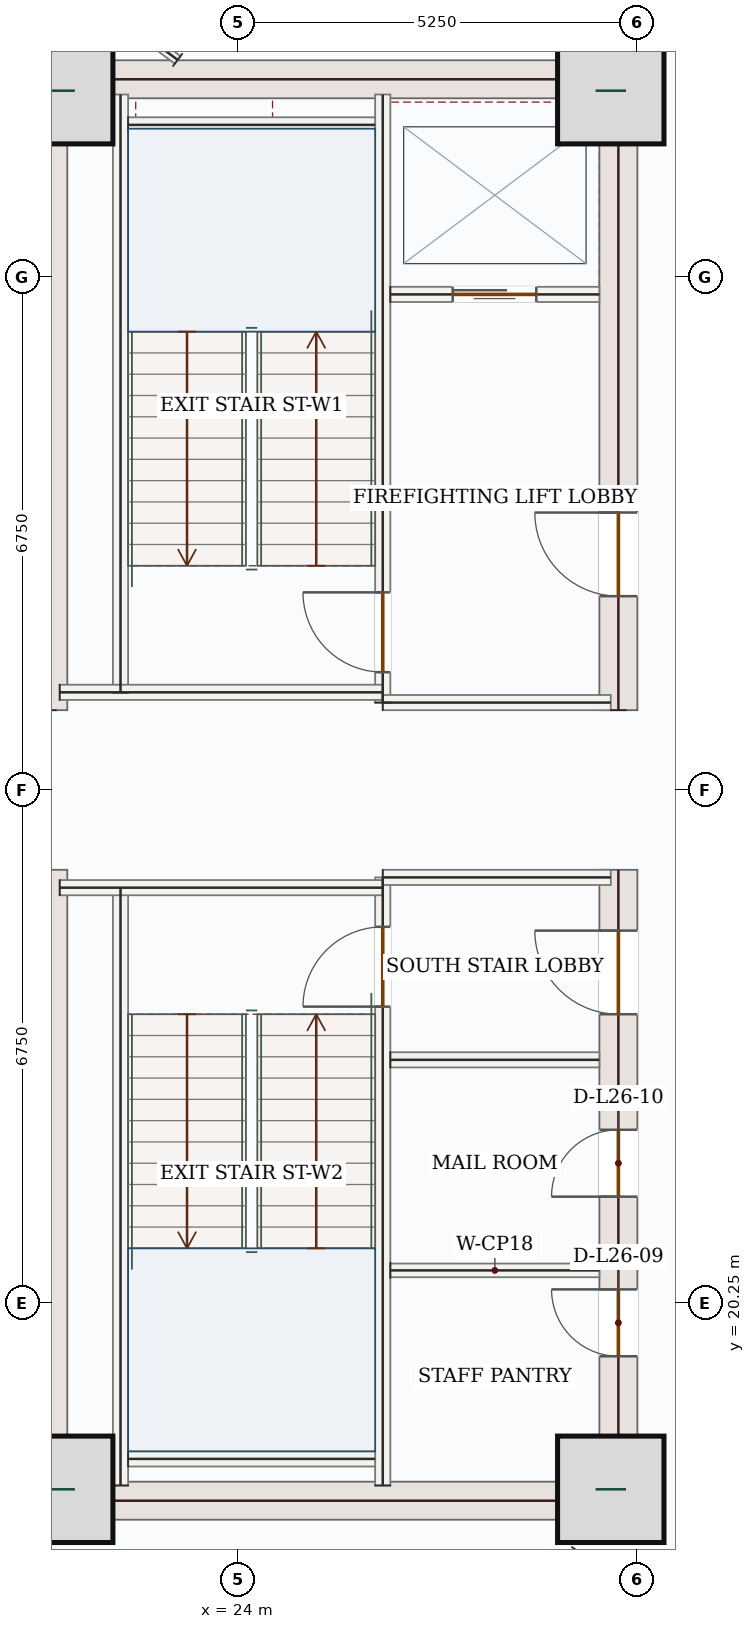
"""IFC4 building model, lengths in metres.
Left out: names, types, materials, properties, quantities, classifications, styles, units other than length and angle.
Written with IfcOpenShell. Run it as: python <this file> out.ifc"""

import sys

from ifc_helpers import new_model, si_unit, direction, frame, frame_2d, origin, origin_2d, place, context, subcontext, project, spatial, rectangle, extrude, source, transform, mapped, element, fill, save


model = new_model("IFC4")
c1 = context("Model", 3, precision=1e-05, world=origin(), true_north=direction((0.0, 1.0)))
c2 = subcontext(c1, "Body", "Model", "MODEL_VIEW")
j1 = project(units=[si_unit("LENGTHUNIT", "METRE"), si_unit("PLANEANGLEUNIT", "RADIAN")], contexts=[c1])
p1 = place(None, origin())
s1 = spatial("IfcSite", under=j1, at=p1, CompositionType="ELEMENT")
p2 = place(p1, origin())
s2 = spatial("IfcBuilding", under=s1, at=p2, CompositionType="ELEMENT")
p3 = place(p2, frame((0.0, 0.0, 117.3)))
s3 = spatial("IfcBuildingStorey", under=s2, at=p3, CompositionType="ELEMENT", Elevation=117.3)
m1 = source(origin(), c2, "Body", "SweptSolid", [
    extrude(rectangle(XDim=8.55, YDim=0.5, at=frame_2d((4.275, 0.0))), origin(), (0.0, 0.0, 1.0), 3.95),
])
for number, where, z_axis, x_axis in (
    (1, (21.5, 17.4, 0.0), (0.0, 0.0, 1.0), (0.0, 1.0, 0.0)),
    (2, (21.5, 28.05, 0.0), (0.0, 0.0, 1.0), (0.0, 1.0, 0.0)),
):
    element("IfcWall", number, at=place(p3, frame(where, z_axis=z_axis, x_axis=x_axis)), inside=s3, PredefinedType="SHEAR", context=c2, shape_type="MappedRepresentation", body=[
        mapped(m1, transform((0.0, 0.0, 0.0), x_axis=(1.0, 0.0, 0.0), y_axis=(0.0, 1.0, 0.0), z_axis=(0.0, 0.0, 1.0), scale=1.0)),
    ])
p4 = place(p3, frame((29.0, 17.4, 0.0), z_axis=(0.0, 0.0, 1.0), x_axis=(0.0, 1.0, 0.0)))
e3 = element("IfcWall", 3, at=p4, inside=s3, PredefinedType="SHEAR", context=c2, shape_type="SweptSolid", body=[
    extrude(rectangle(XDim=8.55, YDim=0.5, at=frame_2d((4.275, 0.0))), origin(), (0.0, 0.0, 1.0), 3.95),
])
p5 = place(p4, frame((6.65, 0.0, 0.0)))
e4 = element("IfcOpeningElement", 4, at=p5, cuts=e3, PredefinedType="OPENING", context=c2, shape_type="SweptSolid", body=[
    extrude(rectangle(XDim=1.1, YDim=2.2, at=frame_2d((0.55, 1.1))), frame((0.0, 0.26, 0.0), z_axis=(0.0, -1.0, 0.0), x_axis=(1.0, 0.0, 0.0)), (0.0, 0.0, 1.0), 0.52),
])
p6 = place(p4, frame((2.15, 0.0, 0.0)))
e5 = element("IfcOpeningElement", 5, at=p6, cuts=e3, PredefinedType="OPENING", context=c2, shape_type="SweptSolid", body=[
    extrude(rectangle(XDim=0.88, YDim=2.1, at=frame_2d((0.44, 1.05))), frame((0.0, 0.26, 0.0), z_axis=(0.0, -1.0, 0.0), x_axis=(1.0, 0.0, 0.0)), (0.0, 0.0, 1.0), 0.52),
])
p7 = place(p4, frame((4.25, 0.0, 0.0)))
e6 = element("IfcOpeningElement", 6, at=p7, cuts=e3, PredefinedType="OPENING", context=c2, shape_type="SweptSolid", body=[
    extrude(rectangle(XDim=0.88, YDim=2.1, at=frame_2d((0.44, 1.05))), frame((0.0, 0.26, 0.0), z_axis=(0.0, -1.0, 0.0), x_axis=(1.0, 0.0, 0.0)), (0.0, 0.0, 1.0), 0.52),
])
p8 = place(p3, frame((29.0, 28.05, 0.0), z_axis=(0.0, 0.0, 1.0), x_axis=(0.0, 1.0, 0.0)))
e7 = element("IfcWall", 7, at=p8, inside=s3, PredefinedType="SHEAR", context=c2, shape_type="SweptSolid", body=[
    extrude(rectangle(XDim=8.55, YDim=0.5, at=frame_2d((4.275, 0.0))), origin(), (0.0, 0.0, 1.0), 3.95),
])
p9 = place(p8, frame((1.5, 0.0, 0.0)))
e8 = element("IfcOpeningElement", 8, at=p9, cuts=e7, PredefinedType="OPENING", context=c2, shape_type="SweptSolid", body=[
    extrude(rectangle(XDim=1.1, YDim=2.2, at=frame_2d((0.55, 1.1))), frame((0.0, 0.26, 0.0), z_axis=(0.0, -1.0, 0.0), x_axis=(1.0, 0.0, 0.0)), (0.0, 0.0, 1.0), 0.52),
])
m2 = source(origin(), c2, "Body", "SweptSolid", [
    extrude(rectangle(XDim=7.0, YDim=0.5, at=frame_2d((3.5, 0.0))), origin(), (0.0, 0.0, 1.0), 3.95),
])
for number, where, z_axis, x_axis in (
    (9, (21.75, 17.65, 0.0), (0.0, 0.0, 1.0), (1.0, 0.0, 0.0)),
    (10, (21.75, 36.35, 0.0), (0.0, 0.0, 1.0), (1.0, 0.0, 0.0)),
):
    element("IfcWall", number, at=place(p3, frame(where, z_axis=z_axis, x_axis=x_axis)), inside=s3, PredefinedType="SHEAR", context=c2, shape_type="MappedRepresentation", body=[
        mapped(m2, transform((0.0, 0.0, 0.0), x_axis=(1.0, 0.0, 0.0), y_axis=(0.0, 1.0, 0.0), z_axis=(0.0, 0.0, 1.0), scale=1.0)),
    ])
m3 = source(origin(), c2, "Body", "SweptSolid", [
    extrude(rectangle(XDim=1.4, YDim=1.4, at=origin_2d()), origin(), (0.0, 0.0, 1.0), 4.2),
])
for number, where, z_axis, x_axis in (
    (11, (21.65, 17.8, 0.0), (0.0, 0.0, 1.0), (1.0, 0.0, 0.0)),
    (12, (28.9, 17.8, 0.0), (0.0, 0.0, 1.0), (1.0, 0.0, 0.0)),
    (13, (21.65, 36.2, 0.0), (0.0, 0.0, 1.0), (1.0, 0.0, 0.0)),
    (14, (28.9, 36.2, 0.0), (0.0, 0.0, 1.0), (1.0, 0.0, 0.0)),
):
    element("IfcColumn", number, at=place(p3, frame(where, z_axis=z_axis, x_axis=x_axis)), inside=s3, PredefinedType="COLUMN", context=c2, shape_type="MappedRepresentation", body=[
        mapped(m3, transform((0.0, 0.0, 0.0), x_axis=(1.0, 0.0, 0.0), y_axis=(0.0, 1.0, 0.0), z_axis=(0.0, 0.0, 1.0), scale=1.0)),
    ])
p10 = place(p3, frame((22.658, 14.74, 0.0), z_axis=(0.0, 0.0, 1.0), x_axis=(-0.707106781187, 0.707106781187, 0.0)))
e15 = element("IfcWall", 15, at=p10, inside=s3, PredefinedType="SOLIDWALL", context=c2, shape_type="SweptSolid", body=[
    extrude(rectangle(XDim=4.545, YDim=0.32, at=frame_2d((2.272, 0.0))), origin(), (0.0, 0.0, 1.0), 3.95),
])
p11 = place(p10, frame((1.073, 0.0, 0.85)))
e16 = element("IfcOpeningElement", 16, at=p11, cuts=e15, PredefinedType="OPENING", context=c2, shape_type="SweptSolid", body=[
    extrude(rectangle(XDim=2.4, YDim=1.8, at=frame_2d((1.2, 0.9))), frame((0.0, 0.17, 0.0), z_axis=(0.0, -1.0, 0.0), x_axis=(1.0, 0.0, 0.0)), (0.0, 0.0, 1.0), 0.34),
])
m4 = source(origin(), c2, "Body", "SweptSolid", [
    extrude(rectangle(XDim=5.258, YDim=0.32, at=frame_2d((2.629, 0.0))), origin(), (0.0, 0.0, 1.0), 3.95),
])
p12 = place(p3, frame((18.94, 35.542, 0.0), z_axis=(0.0, 0.0, 1.0), x_axis=(0.707106781187, 0.707106781187, 0.0)))
e17 = element("IfcWall", 17, at=p12, inside=s3, PredefinedType="SOLIDWALL", context=c2, shape_type="MappedRepresentation", body=[
    mapped(m4, transform((0.0, 0.0, 0.0), x_axis=(1.0, 0.0, 0.0), y_axis=(0.0, 1.0, 0.0), z_axis=(0.0, 0.0, 1.0), scale=1.0)),
])
m5 = source(origin(), c2, "Body", "SweptSolid", [
    extrude(rectangle(XDim=7.87, YDim=0.2, at=frame_2d((3.935, 0.0))), origin(), (0.0, 0.0, 1.0), 3.95),
])
for number, where, z_axis, x_axis in (
    (18, (22.45, 17.85, 0.0), (0.0, 0.0, 1.0), (0.0, 1.0, 0.0)),
    (19, (22.45, 28.28, 0.0), (0.0, 0.0, 1.0), (0.0, 1.0, 0.0)),
):
    element("IfcWall", number, at=place(p3, frame(where, z_axis=z_axis, x_axis=x_axis)), inside=s3, PredefinedType="SOLIDWALL", context=c2, shape_type="MappedRepresentation", body=[
        mapped(m5, transform((0.0, 0.0, 0.0), x_axis=(1.0, 0.0, 0.0), y_axis=(0.0, 1.0, 0.0), z_axis=(0.0, 0.0, 1.0), scale=1.0)),
    ])
p13 = place(p3, frame((25.9, 17.85, 0.0), z_axis=(0.0, 0.0, 1.0), x_axis=(0.0, 1.0, 0.0)))
e20 = element("IfcWall", 20, at=p13, inside=s3, PredefinedType="SOLIDWALL", context=c2, shape_type="SweptSolid", body=[
    extrude(rectangle(XDim=8.0, YDim=0.2, at=frame_2d((4.0, 0.0))), origin(), (0.0, 0.0, 1.0), 3.95),
])
p14 = place(p13, frame((6.3, 0.0, 0.0)))
e21 = element("IfcOpeningElement", 21, at=p14, cuts=e20, PredefinedType="OPENING", context=c2, shape_type="SweptSolid", body=[
    extrude(rectangle(XDim=1.05, YDim=2.15, at=frame_2d((0.525, 1.075))), frame((0.0, 0.11, 0.0), z_axis=(0.0, -1.0, 0.0), x_axis=(1.0, 0.0, 0.0)), (0.0, 0.0, 1.0), 0.22),
])
p15 = place(p3, frame((25.9, 28.15, 0.0), z_axis=(0.0, 0.0, 1.0), x_axis=(0.0, 1.0, 0.0)))
e22 = element("IfcWall", 22, at=p15, inside=s3, PredefinedType="SOLIDWALL", context=c2, shape_type="SweptSolid", body=[
    extrude(rectangle(XDim=8.0, YDim=0.2, at=frame_2d((4.0, 0.0))), origin(), (0.0, 0.0, 1.0), 3.95),
])
p16 = place(p15, frame((0.4, 0.0, 0.0)))
e23 = element("IfcOpeningElement", 23, at=p16, cuts=e22, PredefinedType="OPENING", context=c2, shape_type="SweptSolid", body=[
    extrude(rectangle(XDim=1.05, YDim=2.15, at=frame_2d((0.525, 1.075))), frame((0.0, 0.11, 0.0), z_axis=(0.0, -1.0, 0.0), x_axis=(1.0, 0.0, 0.0)), (0.0, 0.0, 1.0), 0.22),
])
m6 = source(origin(), c2, "Body", "SweptSolid", [
    extrude(rectangle(XDim=4.25, YDim=0.2, at=frame_2d((2.125, 0.0))), origin(), (0.0, 0.0, 1.0), 3.95),
])
p17 = place(p3, frame((21.65, 25.715, 0.0), z_axis=(0.0, 0.0, 1.0), x_axis=(1.0, 0.0, 0.0)))
e24 = element("IfcWall", 24, at=p17, inside=s3, PredefinedType="SOLIDWALL", context=c2, shape_type="MappedRepresentation", body=[
    mapped(m6, transform((0.0, 0.0, 0.0), x_axis=(1.0, 0.0, 0.0), y_axis=(0.0, 1.0, 0.0), z_axis=(0.0, 0.0, 1.0), scale=1.0)),
])
m7 = source(origin(), c2, "Body", "SweptSolid", [
    extrude(rectangle(XDim=3.0, YDim=0.2, at=frame_2d((1.5, 0.0))), origin(), (0.0, 0.0, 1.0), 3.95),
])
p18 = place(p3, frame((25.9, 25.85, 0.0), z_axis=(0.0, 0.0, 1.0), x_axis=(1.0, 0.0, 0.0)))
e25 = element("IfcWall", 25, at=p18, inside=s3, PredefinedType="SOLIDWALL", context=c2, shape_type="MappedRepresentation", body=[
    mapped(m7, transform((0.0, 0.0, 0.0), x_axis=(1.0, 0.0, 0.0), y_axis=(0.0, 1.0, 0.0), z_axis=(0.0, 0.0, 1.0), scale=1.0)),
])
p19 = place(p3, frame((21.65, 28.285, 0.0), z_axis=(0.0, 0.0, 1.0), x_axis=(1.0, 0.0, 0.0)))
e26 = element("IfcWall", 26, at=p19, inside=s3, PredefinedType="SOLIDWALL", context=c2, shape_type="MappedRepresentation", body=[
    mapped(m6, transform((0.0, 0.0, 0.0), x_axis=(1.0, 0.0, 0.0), y_axis=(0.0, 1.0, 0.0), z_axis=(0.0, 0.0, 1.0), scale=1.0)),
])
p20 = place(p3, frame((25.9, 28.15, 0.0), z_axis=(0.0, 0.0, 1.0), x_axis=(1.0, 0.0, 0.0)))
e27 = element("IfcWall", 27, at=p20, inside=s3, PredefinedType="SOLIDWALL", context=c2, shape_type="MappedRepresentation", body=[
    mapped(m7, transform((0.0, 0.0, 0.0), x_axis=(1.0, 0.0, 0.0), y_axis=(0.0, 1.0, 0.0), z_axis=(0.0, 0.0, 1.0), scale=1.0)),
])
m8 = source(origin(), c2, "Body", "SweptSolid", [
    extrude(rectangle(XDim=3.25, YDim=0.2, at=frame_2d((1.625, 0.0))), origin(), (0.0, 0.0, 1.0), 3.95),
])
for number, where, z_axis, x_axis in (
    (28, (22.55, 35.75, 0.0), (0.0, 0.0, 1.0), (1.0, 0.0, 0.0)),
    (29, (22.55, 18.2, 0.0), (0.0, 0.0, 1.0), (1.0, 0.0, 0.0)),
):
    element("IfcWall", number, at=place(p3, frame(where, z_axis=z_axis, x_axis=x_axis)), inside=s3, PredefinedType="SOLIDWALL", context=c2, shape_type="MappedRepresentation", body=[
        mapped(m8, transform((0.0, 0.0, 0.0), x_axis=(1.0, 0.0, 0.0), y_axis=(0.0, 1.0, 0.0), z_axis=(0.0, 0.0, 1.0), scale=1.0)),
    ])
p21 = place(p3, frame((26.0, 33.52, 0.0), z_axis=(0.0, 0.0, 1.0), x_axis=(1.0, 0.0, 0.0)))
e30 = element("IfcWall", 30, at=p21, inside=s3, PredefinedType="SOLIDWALL", context=c2, shape_type="SweptSolid", body=[
    extrude(rectangle(XDim=2.75, YDim=0.2, at=frame_2d((1.375, 0.0))), origin(), (0.0, 0.0, 1.0), 3.95),
])
p22 = place(p21, frame((0.82, 0.0, 0.0)))
e31 = element("IfcOpeningElement", 31, at=p22, cuts=e30, PredefinedType="OPENING", context=c2, shape_type="SweptSolid", body=[
    extrude(rectangle(XDim=1.1, YDim=2.15, at=frame_2d((0.55, 1.075))), frame((0.0, 0.11, 0.0), z_axis=(0.0, -1.0, 0.0), x_axis=(1.0, 0.0, 0.0)), (0.0, 0.0, 1.0), 0.22),
])
m9 = source(origin(), c2, "Body", "SweptSolid", [
    extrude(rectangle(XDim=2.75, YDim=0.2, at=frame_2d((1.375, 0.0))), origin(), (0.0, 0.0, 1.0), 3.95),
])
p23 = place(p3, frame((26.0, 23.45, 0.0), z_axis=(0.0, 0.0, 1.0), x_axis=(1.0, 0.0, 0.0)))
e32 = element("IfcWall", 32, at=p23, inside=s3, PredefinedType="SOLIDWALL", context=c2, shape_type="MappedRepresentation", body=[
    mapped(m9, transform((0.0, 0.0, 0.0), x_axis=(1.0, 0.0, 0.0), y_axis=(0.0, 1.0, 0.0), z_axis=(0.0, 0.0, 1.0), scale=1.0)),
])
m10 = source(origin(), c2, "Body", "SweptSolid", [
    extrude(rectangle(XDim=2.75, YDim=0.18, at=frame_2d((1.375, 0.0))), origin(), (0.0, 0.0, 1.0), 3.95),
])
p24 = place(p3, frame((26.0, 20.68, 0.0), z_axis=(0.0, 0.0, 1.0), x_axis=(1.0, 0.0, 0.0)))
e33 = element("IfcWall", 33, at=p24, inside=s3, PredefinedType="PARTITIONING", context=c2, shape_type="MappedRepresentation", body=[
    mapped(m10, transform((0.0, 0.0, 0.0), x_axis=(1.0, 0.0, 0.0), y_axis=(0.0, 1.0, 0.0), z_axis=(0.0, 0.0, 1.0), scale=1.0)),
])
m11 = source(origin(), c2, "Body", "SweptSolid", [
    extrude(rectangle(XDim=2.119, YDim=0.125, at=frame_2d((1.059, 0.0))), origin(), (0.0, 0.0, 1.0), 3.95),
])
p25 = place(p3, frame((23.202, 36.605, 0.0), z_axis=(0.0, 0.0, 1.0), x_axis=(-0.801201403988, 0.598394777925, 0.0)))
e34 = element("IfcWall", 34, at=p25, inside=s3, PredefinedType="PARTITIONING", context=c2, shape_type="MappedRepresentation", body=[
    mapped(m11, transform((0.0, 0.0, 0.0), x_axis=(1.0, 0.0, 0.0), y_axis=(0.0, 1.0, 0.0), z_axis=(0.0, 0.0, 1.0), scale=1.0)),
])
m12 = source(origin(), c2, "Body", "SweptSolid", [
    extrude(rectangle(XDim=2.59, YDim=0.125, at=frame_2d((1.295, 0.0))), origin(), (0.0, 0.0, 1.0), 3.95),
])
p26 = place(p3, frame((28.47, 16.98, 0.0), z_axis=(0.0, 0.0, 1.0), x_axis=(-0.598354601134, -0.801231409333, 0.0)))
e35 = element("IfcWall", 35, at=p26, inside=s3, PredefinedType="PARTITIONING", context=c2, shape_type="MappedRepresentation", body=[
    mapped(m12, transform((0.0, 0.0, 0.0), x_axis=(1.0, 0.0, 0.0), y_axis=(0.0, 1.0, 0.0), z_axis=(0.0, 0.0, 1.0), scale=1.0)),
])
m13 = source(origin(), c2, "Body", "SweptSolid", [
    extrude(rectangle(XDim=2.4, YDim=1.8, at=frame_2d((1.2, 0.9))), frame((0.0, 0.03, 0.0), z_axis=(0.0, -1.0, 0.0), x_axis=(1.0, 0.0, 0.0)), (0.0, 0.0, 1.0), 0.06),
])
p27 = place(p11, origin())
e36 = element("IfcWindow", 36, at=p27, inside=s3, PartitioningType="DOUBLE_PANEL_VERTICAL", PredefinedType="WINDOW", context=c2, shape_type="MappedRepresentation", body=[
    mapped(m13, transform((0.0, 0.0, 0.0), x_axis=(1.0, 0.0, 0.0), y_axis=(0.0, 1.0, 0.0), z_axis=(0.0, 0.0, 1.0), scale=1.0)),
])
fill(e16, e36)
m14 = source(origin(), c2, "Body", "SweptSolid", [
    extrude(rectangle(XDim=1.05, YDim=2.15, at=frame_2d((0.525, 1.075))), frame((0.0, 0.025, 0.0), z_axis=(0.0, -1.0, 0.0), x_axis=(1.0, 0.0, 0.0)), (0.0, 0.0, 1.0), 0.05),
])
p28 = place(p16, origin())
e37 = element("IfcDoor", 37, at=p28, inside=s3, OperationType="SINGLE_SWING_RIGHT", PredefinedType="DOOR", context=c2, shape_type="MappedRepresentation", body=[
    mapped(m14, transform((0.0, 0.0, 0.0), x_axis=(1.0, 0.0, 0.0), y_axis=(0.0, 1.0, 0.0), z_axis=(0.0, 0.0, 1.0), scale=1.0)),
])
fill(e23, e37)
p29 = place(p14, origin())
e38 = element("IfcDoor", 38, at=p29, inside=s3, OperationType="SINGLE_SWING_LEFT", PredefinedType="DOOR", context=c2, shape_type="MappedRepresentation", body=[
    mapped(m14, transform((0.0, 0.0, 0.0), x_axis=(1.0, 0.0, 0.0), y_axis=(0.0, 1.0, 0.0), z_axis=(0.0, 0.0, 1.0), scale=1.0)),
])
fill(e21, e38)
m15 = source(origin(), c2, "Body", "SweptSolid", [
    extrude(rectangle(XDim=1.1, YDim=2.15, at=frame_2d((0.55, 1.075))), frame((0.0, 0.025, 0.0), z_axis=(0.0, -1.0, 0.0), x_axis=(1.0, 0.0, 0.0)), (0.0, 0.0, 1.0), 0.05),
])
p30 = place(p22, origin())
e39 = element("IfcDoor", 39, at=p30, inside=s3, OperationType="DOUBLE_DOOR_SLIDING", PredefinedType="DOOR", context=c2, shape_type="MappedRepresentation", body=[
    mapped(m15, transform((0.0, 0.0, 0.0), x_axis=(1.0, 0.0, 0.0), y_axis=(0.0, 1.0, 0.0), z_axis=(0.0, 0.0, 1.0), scale=1.0)),
])
fill(e31, e39)
m16 = source(origin(), c2, "Body", "SweptSolid", [
    extrude(rectangle(XDim=1.1, YDim=2.2, at=frame_2d((0.55, 1.1))), frame((0.0, 0.025, 0.0), z_axis=(0.0, -1.0, 0.0), x_axis=(1.0, 0.0, 0.0)), (0.0, 0.0, 1.0), 0.05),
])
p31 = place(p9, origin())
e40 = element("IfcDoor", 40, at=p31, inside=s3, OperationType="SINGLE_SWING_RIGHT", PredefinedType="DOOR", context=c2, shape_type="MappedRepresentation", body=[
    mapped(m16, transform((0.0, 0.0, 0.0), x_axis=(1.0, 0.0, 0.0), y_axis=(0.0, 1.0, 0.0), z_axis=(0.0, 0.0, 1.0), scale=1.0)),
])
fill(e8, e40)
p32 = place(p5, origin())
e41 = element("IfcDoor", 41, at=p32, inside=s3, OperationType="SINGLE_SWING_RIGHT", PredefinedType="DOOR", context=c2, shape_type="MappedRepresentation", body=[
    mapped(m16, transform((0.0, 0.0, 0.0), x_axis=(1.0, 0.0, 0.0), y_axis=(0.0, 1.0, 0.0), z_axis=(0.0, 0.0, 1.0), scale=1.0)),
])
fill(e4, e41)
m17 = source(origin(), c2, "Body", "SweptSolid", [
    extrude(rectangle(XDim=0.88, YDim=2.1, at=frame_2d((0.44, 1.05))), frame((0.0, 0.025, 0.0), z_axis=(0.0, -1.0, 0.0), x_axis=(1.0, 0.0, 0.0)), (0.0, 0.0, 1.0), 0.05),
])
p33 = place(p6, origin())
e42 = element("IfcDoor", 42, at=p33, inside=s3, OperationType="SINGLE_SWING_RIGHT", PredefinedType="DOOR", context=c2, shape_type="MappedRepresentation", body=[
    mapped(m17, transform((0.0, 0.0, 0.0), x_axis=(1.0, 0.0, 0.0), y_axis=(0.0, 1.0, 0.0), z_axis=(0.0, 0.0, 1.0), scale=1.0)),
])
fill(e5, e42)
p34 = place(p7, origin())
e43 = element("IfcDoor", 43, at=p34, inside=s3, OperationType="SINGLE_SWING_LEFT", PredefinedType="DOOR", context=c2, shape_type="MappedRepresentation", body=[
    mapped(m17, transform((0.0, 0.0, 0.0), x_axis=(1.0, 0.0, 0.0), y_axis=(0.0, 1.0, 0.0), z_axis=(0.0, 0.0, 1.0), scale=1.0)),
])
fill(e6, e43)
save(model, sys.argv[1])
